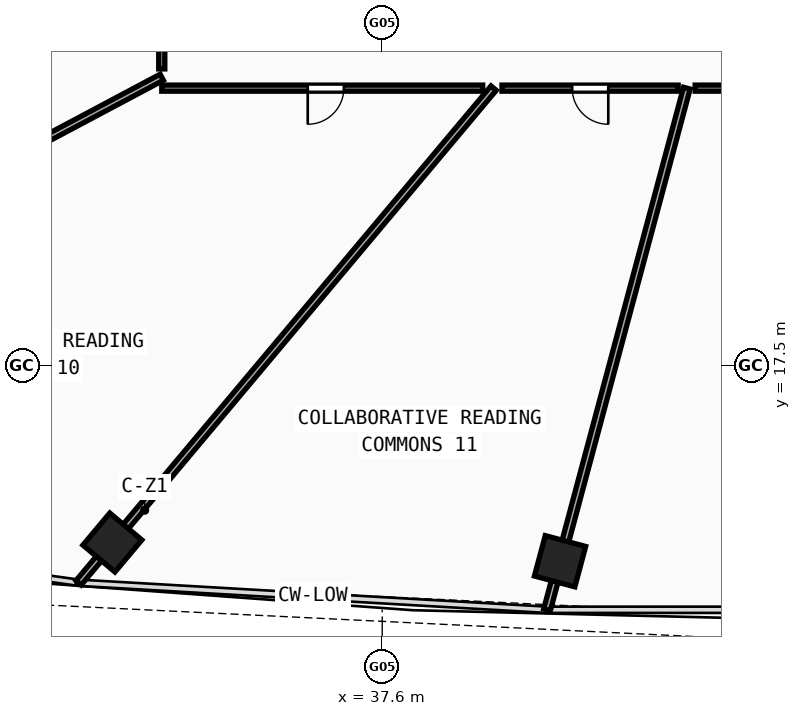
"""IFC4 building model, lengths in metres.
Left out: names, types, materials, properties, quantities, classifications, styles, units other than length and angle.
Written with IfcOpenShell. Run it as: python <this file> out.ifc"""

import sys

from ifc_helpers import new_model, si_unit, direction, frame, frame_2d, origin, origin_with_axes, origin_2d, place, context, subcontext, project, spatial, rectangle, hollow_rectangle, extrude, source, transform, mapped, element, fill, save


model = new_model("IFC4")
c1 = context("Model", 3, precision=1e-05, world=origin(), true_north=direction((0.0, 1.0)))
c2 = subcontext(c1, "Body", "Model", "MODEL_VIEW")
j1 = project(units=[si_unit("LENGTHUNIT", "METRE"), si_unit("PLANEANGLEUNIT", "RADIAN")], contexts=[c1])
p1 = place(None, origin())
s1 = spatial("IfcSite", under=j1, at=p1, CompositionType="ELEMENT")
p2 = place(p1, origin())
s2 = spatial("IfcBuilding", under=s1, at=p2, CompositionType="ELEMENT")
p3 = place(p2, frame((0.0, 0.0, 55.81)))
s3 = spatial("IfcBuildingStorey", under=s2, at=p3, CompositionType="ELEMENT", Elevation=55.81)
m1 = source(origin(), c2, "Body", "SweptSolid", [
    extrude(hollow_rectangle(XDim=1.1, YDim=1.1, WallThickness=0.045, at=origin_2d()), origin(), (0.0, 0.0, 1.0), 3.63),
])
for number, where, z_axis, x_axis in (
    (1, (30.5, 12.844, -0.26), (0.0, 0.0, 1.0), (0.766, -0.643, 0.0)),
    (2, (42.28, 12.352, -0.26), (0.0, 0.0, 1.0), (0.966, -0.259, 0.0)),
):
    element("IfcColumn", number, at=place(p3, frame(where, z_axis=z_axis, x_axis=x_axis)), inside=s3, PredefinedType="COLUMN", context=c2, shape_type="MappedRepresentation", body=[
        mapped(m1, transform((0.0, 0.0, 0.0), scale=1.0)),
    ])
p4 = place(p3, frame((31.8, 25.086, 0.0), z_axis=(0.0, 0.0, 1.0), x_axis=(-0.882952279159, -0.469462749032, 0.0)))
e3 = element("IfcWall", 3, at=p4, inside=s3, PredefinedType="PARTITIONING", context=c2, shape_type="SweptSolid", body=[
    extrude(rectangle(XDim=22.965, YDim=0.18, at=frame_2d((11.482, 0.0))), origin(), (0.0, 0.0, 1.0), 2.67),
])
p5 = place(p3, frame((40.532, 24.8, 0.0), z_axis=(0.0, 0.0, 1.0), x_axis=(-0.642791593325, -0.766041100432, 0.0)))
e4 = element("IfcWall", 4, at=p5, inside=s3, PredefinedType="PARTITIONING", context=c2, shape_type="SweptSolid", body=[
    extrude(rectangle(XDim=16.988, YDim=0.18, at=frame_2d((8.494, 0.0))), origin(), (0.0, 0.0, 1.0), 2.67),
])
p6 = place(p3, frame((45.615, 24.8, 0.0), z_axis=(0.0, 0.0, 1.0), x_axis=(-0.258821679731, -0.965925120339, 0.0)))
e5 = element("IfcWall", 5, at=p6, inside=s3, PredefinedType="PARTITIONING", context=c2, shape_type="SweptSolid", body=[
    extrude(rectangle(XDim=14.209, YDim=0.18, at=frame_2d((7.105, 0.0))), origin(), (0.0, 0.0, 1.0), 2.67),
])
p7 = place(p3, frame((31.8, 25.306, 0.0), z_axis=(0.0, 0.0, 1.0), x_axis=(0.0, 1.0, 0.0)))
e6 = element("IfcWall", 6, at=p7, inside=s3, PredefinedType="PARTITIONING", context=c2, shape_type="SweptSolid", body=[
    extrude(rectangle(XDim=5.314, YDim=0.16, at=frame_2d((2.657, 0.0))), origin(), (0.0, 0.0, 1.0), 2.97),
])
p8 = place(p7, frame((2.184, 0.0, 0.0)))
e7 = element("IfcOpeningElement", 7, at=p8, cuts=e6, PredefinedType="OPENING", context=c2, shape_type="SweptSolid", body=[
    extrude(rectangle(XDim=0.95, YDim=2.1, at=frame_2d((0.475, 1.05))), frame((0.0, 0.09, 0.0), z_axis=(0.0, -1.0, 0.0), x_axis=(1.0, 0.0, 0.0)), (0.0, 0.0, 1.0), 0.18),
])
p9 = place(p3, frame((55.248, 24.8, 0.0), z_axis=(0.0, 0.0, 1.0), x_axis=(-1.0, 0.0, 0.0)))
e8 = element("IfcWall", 8, at=p9, inside=s3, PredefinedType="PARTITIONING", context=c2, shape_type="SweptSolid", body=[
    extrude(rectangle(XDim=9.413, YDim=0.16, at=frame_2d((4.707, 0.0))), origin(), (0.0, 0.0, 1.0), 2.67),
])
p10 = place(p9, frame((4.231, 0.0, 0.0)))
e9 = element("IfcOpeningElement", 9, at=p10, cuts=e8, PredefinedType="OPENING", context=c2, shape_type="SweptSolid", body=[
    extrude(rectangle(XDim=0.95, YDim=2.1, at=frame_2d((0.475, 1.05))), frame((0.0, 0.09, 0.0), z_axis=(0.0, -1.0, 0.0), x_axis=(1.0, 0.0, 0.0)), (0.0, 0.0, 1.0), 0.18),
])
p11 = place(p3, frame((45.387, 24.8, 0.0), z_axis=(0.0, 0.0, 1.0), x_axis=(-1.0, 0.0, 0.0)))
e10 = element("IfcWall", 10, at=p11, inside=s3, PredefinedType="PARTITIONING", context=c2, shape_type="SweptSolid", body=[
    extrude(rectangle(XDim=4.635, YDim=0.16, at=frame_2d((2.318, 0.0))), origin(), (0.0, 0.0, 1.0), 2.67),
])
p12 = place(p11, frame((1.839, 0.0, 0.0)))
e11 = element("IfcOpeningElement", 11, at=p12, cuts=e10, PredefinedType="OPENING", context=c2, shape_type="SweptSolid", body=[
    extrude(rectangle(XDim=0.95, YDim=2.1, at=frame_2d((0.475, 1.05))), frame((0.0, 0.09, 0.0), z_axis=(0.0, -1.0, 0.0), x_axis=(1.0, 0.0, 0.0)), (0.0, 0.0, 1.0), 0.18),
])
p13 = place(p3, frame((40.245, 24.8, 0.0), z_axis=(0.0, 0.0, 1.0), x_axis=(-1.0, 0.0, 0.0)))
e12 = element("IfcWall", 12, at=p13, inside=s3, PredefinedType="PARTITIONING", context=c2, shape_type="SweptSolid", body=[
    extrude(rectangle(XDim=8.445, YDim=0.16, at=frame_2d((4.222, 0.0))), origin(), (0.0, 0.0, 1.0), 2.97),
])
p14 = place(p13, frame((3.654, 0.0, 0.0)))
e13 = element("IfcOpeningElement", 13, at=p14, cuts=e12, PredefinedType="OPENING", context=c2, shape_type="SweptSolid", body=[
    extrude(rectangle(XDim=0.95, YDim=2.1, at=frame_2d((0.475, 1.05))), frame((0.0, 0.09, 0.0), z_axis=(0.0, -1.0, 0.0), x_axis=(1.0, 0.0, 0.0)), (0.0, 0.0, 1.0), 0.18),
])
m2 = source(origin(), c2, "Body", "SweptSolid", [
    extrude(rectangle(XDim=0.95, YDim=2.1, at=frame_2d((0.475, 1.05))), frame((0.0, 0.025, 0.0), z_axis=(0.0, -1.0, 0.0), x_axis=(1.0, 0.0, 0.0)), (0.0, 0.0, 1.0), 0.05),
])
p15 = place(p14, origin_with_axes())
e14 = element("IfcDoor", 14, at=p15, inside=s3, OperationType="SINGLE_SWING_RIGHT", PredefinedType="DOOR", context=c2, shape_type="MappedRepresentation", body=[
    mapped(m2, transform((0.0, 0.0, 0.0), scale=1.0)),
])
fill(e13, e14)
p16 = place(p12, origin_with_axes())
e15 = element("IfcDoor", 15, at=p16, inside=s3, OperationType="SINGLE_SWING_LEFT", PredefinedType="DOOR", context=c2, shape_type="MappedRepresentation", body=[
    mapped(m2, transform((0.0, 0.0, 0.0), scale=1.0)),
])
fill(e11, e15)
save(model, sys.argv[1])
